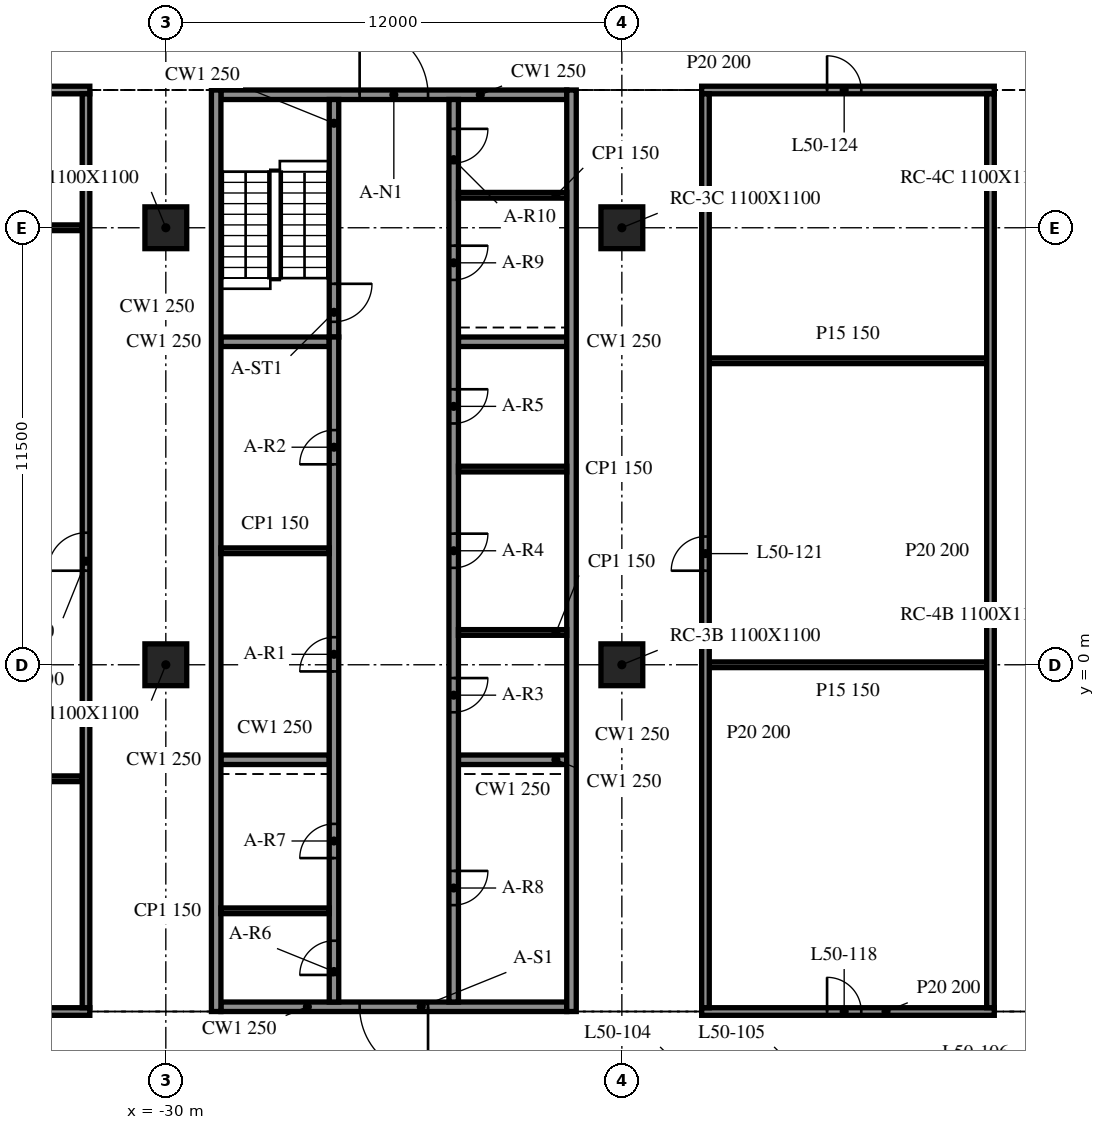
"""IFC4 building model, lengths in metres.
Left out: names, types, materials, properties, quantities, classifications, styles, units other than length and angle.
Written with IfcOpenShell. Run it as: python <this file> out.ifc"""

import sys

from ifc_helpers import new_model, si_unit, direction, frame, frame_2d, origin, origin_2d, place, context, subcontext, project, spatial, rectangle, extrude, element, fill, save


model = new_model("IFC4")
c1 = context("Model", 3, precision=1e-05, world=origin(), true_north=direction((0.0, 1.0)))
c2 = subcontext(c1, "Body", "Model", "MODEL_VIEW")
j1 = project(units=[si_unit("LENGTHUNIT", "METRE"), si_unit("PLANEANGLEUNIT", "RADIAN")], contexts=[c1])
p1 = place(None, origin())
s1 = spatial("IfcSite", under=j1, at=p1, CompositionType="ELEMENT")
p2 = place(p1, origin())
s2 = spatial("IfcBuilding", under=s1, at=p2, CompositionType="ELEMENT")
p3 = place(p2, frame((0.0, 0.0, 209.1)))
s3 = spatial("IfcBuildingStorey", under=s2, at=p3, CompositionType="ELEMENT", Elevation=209.1)
for number, where, z_axis, x_axis in (
    (1, (-30.0, 0.0, -0.34), (0.0, 0.0, 1.0), (1.0, 0.0, 0.0)),
    (2, (-30.0, 11.5, -0.34), (0.0, 0.0, 1.0), (1.0, 0.0, 0.0)),
    (3, (-18.0, 0.0, -0.34), (0.0, 0.0, 1.0), (1.0, 0.0, 0.0)),
    (4, (-18.0, 11.5, -0.34), (0.0, 0.0, 1.0), (1.0, 0.0, 0.0)),
):
    element("IfcColumn", number, at=place(p3, frame(where, z_axis=z_axis, x_axis=x_axis)), inside=s3, PredefinedType="COLUMN", context=c2, shape_type="SweptSolid", body=[
        extrude(rectangle(XDim=1.1, YDim=1.1, at=origin_2d()), origin(), (0.0, 0.0, 1.0), 3.8),
    ])
for number, where, z_axis, x_axis in (
    (5, (-28.675, 15.125, 0.0), (0.0, 0.0, 1.0), (0.0, -1.0, 0.0)),
    (6, (-19.325, -9.125, 0.0), (0.0, 0.0, 1.0), (0.0, 1.0, 0.0)),
):
    element("IfcWall", number, at=place(p3, frame(where, z_axis=z_axis, x_axis=x_axis)), inside=s3, PredefinedType="SOLIDWALL", context=c2, shape_type="SweptSolid", body=[
        extrude(rectangle(XDim=24.25, YDim=0.25, at=frame_2d((12.125, 0.0))), origin(), (0.0, 0.0, 1.0), 3.46),
    ])
p4 = place(p3, frame((-19.45, -9.0, 0.0), z_axis=(0.0, 0.0, 1.0), x_axis=(-1.0, 0.0, 0.0)))
e7 = element("IfcWall", 7, at=p4, inside=s3, PredefinedType="SOLIDWALL", context=c2, shape_type="SweptSolid", body=[
    extrude(rectangle(XDim=9.1, YDim=0.25, at=frame_2d((4.55, 0.0))), origin(), (0.0, 0.0, 1.0), 3.46),
])
p5 = place(p4, frame((3.65, 0.0, 0.0)))
e8 = element("IfcOpeningElement", 8, at=p5, cuts=e7, PredefinedType="OPENING", context=c2, shape_type="SweptSolid", body=[
    extrude(rectangle(XDim=1.8, YDim=2.1, at=frame_2d((0.9, 1.05))), frame((0.0, 0.135, 0.0), z_axis=(0.0, -1.0, 0.0), x_axis=(1.0, 0.0, 0.0)), (0.0, 0.0, 1.0), 0.27),
])
p6 = place(p3, frame((-28.55, 15.0, 0.0), z_axis=(0.0, 0.0, 1.0), x_axis=(1.0, 0.0, 0.0)))
e9 = element("IfcWall", 9, at=p6, inside=s3, PredefinedType="SOLIDWALL", context=c2, shape_type="SweptSolid", body=[
    extrude(rectangle(XDim=9.1, YDim=0.25, at=frame_2d((4.55, 0.0))), origin(), (0.0, 0.0, 1.0), 3.46),
])
p7 = place(p6, frame((3.65, 0.0, 0.0)))
e10 = element("IfcOpeningElement", 10, at=p7, cuts=e9, PredefinedType="OPENING", context=c2, shape_type="SweptSolid", body=[
    extrude(rectangle(XDim=1.8, YDim=2.1, at=frame_2d((0.9, 1.05))), frame((0.0, 0.135, 0.0), z_axis=(0.0, -1.0, 0.0), x_axis=(1.0, 0.0, 0.0)), (0.0, 0.0, 1.0), 0.27),
])
p8 = place(p3, frame((-25.575, -8.875, 0.0), z_axis=(0.0, 0.0, 1.0), x_axis=(0.0, 1.0, 0.0)))
e11 = element("IfcWall", 11, at=p8, inside=s3, PredefinedType="SOLIDWALL", context=c2, shape_type="SweptSolid", body=[
    extrude(rectangle(XDim=17.5, YDim=0.25, at=frame_2d((8.75, 0.0))), origin(), (0.0, 0.0, 1.0), 3.46),
])
p9 = place(p8, frame((8.7, 0.0, 0.0)))
e12 = element("IfcOpeningElement", 12, at=p9, cuts=e11, PredefinedType="OPENING", context=c2, shape_type="SweptSolid", body=[
    extrude(rectangle(XDim=0.9, YDim=2.1, at=frame_2d((0.45, 1.05))), frame((0.0, 0.135, 0.0), z_axis=(0.0, -1.0, 0.0), x_axis=(1.0, 0.0, 0.0)), (0.0, 0.0, 1.0), 0.27),
])
p10 = place(p8, frame((14.15, 0.0, 0.0)))
e13 = element("IfcOpeningElement", 13, at=p10, cuts=e11, PredefinedType="OPENING", context=c2, shape_type="SweptSolid", body=[
    extrude(rectangle(XDim=0.9, YDim=2.1, at=frame_2d((0.45, 1.05))), frame((0.0, 0.135, 0.0), z_axis=(0.0, -1.0, 0.0), x_axis=(1.0, 0.0, 0.0)), (0.0, 0.0, 1.0), 0.27),
])
p11 = place(p8, frame((0.712, 0.0, 0.0)))
e14 = element("IfcOpeningElement", 14, at=p11, cuts=e11, PredefinedType="OPENING", context=c2, shape_type="SweptSolid", body=[
    extrude(rectangle(XDim=0.9, YDim=2.1, at=frame_2d((0.45, 1.05))), frame((0.0, 0.135, 0.0), z_axis=(0.0, -1.0, 0.0), x_axis=(1.0, 0.0, 0.0)), (0.0, 0.0, 1.0), 0.27),
])
p12 = place(p8, frame((3.788, 0.0, 0.0)))
e15 = element("IfcOpeningElement", 15, at=p12, cuts=e11, PredefinedType="OPENING", context=c2, shape_type="SweptSolid", body=[
    extrude(rectangle(XDim=0.9, YDim=2.1, at=frame_2d((0.45, 1.05))), frame((0.0, 0.135, 0.0), z_axis=(0.0, -1.0, 0.0), x_axis=(1.0, 0.0, 0.0)), (0.0, 0.0, 1.0), 0.27),
])
p13 = place(p3, frame((-25.575, 14.875, 0.0), z_axis=(0.0, 0.0, 1.0), x_axis=(0.0, -1.0, 0.0)))
e16 = element("IfcWall", 16, at=p13, inside=s3, PredefinedType="SOLIDWALL", context=c2, shape_type="SweptSolid", body=[
    extrude(rectangle(XDim=6.25, YDim=0.25, at=frame_2d((3.125, 0.0))), origin(), (0.0, 0.0, 1.0), 3.46),
])
p14 = place(p13, frame((4.85, 0.0, 0.0)))
e17 = element("IfcOpeningElement", 17, at=p14, cuts=e16, PredefinedType="OPENING", context=c2, shape_type="SweptSolid", body=[
    extrude(rectangle(XDim=1.0, YDim=2.1, at=frame_2d((0.5, 1.05))), frame((0.0, 0.135, 0.0), z_axis=(0.0, -1.0, 0.0), x_axis=(1.0, 0.0, 0.0)), (0.0, 0.0, 1.0), 0.27),
])
p15 = place(p3, frame((-22.425, 14.875, 0.0), z_axis=(0.0, 0.0, 1.0), x_axis=(0.0, -1.0, 0.0)))
e18 = element("IfcWall", 18, at=p15, inside=s3, PredefinedType="SOLIDWALL", context=c2, shape_type="SweptSolid", body=[
    extrude(rectangle(XDim=23.75, YDim=0.25, at=frame_2d((11.875, 0.0))), origin(), (0.0, 0.0, 1.0), 3.46),
])
p16 = place(p15, frame((15.225, 0.0, 0.0)))
e19 = element("IfcOpeningElement", 19, at=p16, cuts=e18, PredefinedType="OPENING", context=c2, shape_type="SweptSolid", body=[
    extrude(rectangle(XDim=0.9, YDim=2.1, at=frame_2d((0.45, 1.05))), frame((0.0, 0.135, 0.0), z_axis=(0.0, -1.0, 0.0), x_axis=(1.0, 0.0, 0.0)), (0.0, 0.0, 1.0), 0.27),
])
p17 = place(p15, frame((11.425, 0.0, 0.0)))
e20 = element("IfcOpeningElement", 20, at=p17, cuts=e18, PredefinedType="OPENING", context=c2, shape_type="SweptSolid", body=[
    extrude(rectangle(XDim=0.9, YDim=2.1, at=frame_2d((0.45, 1.05))), frame((0.0, 0.135, 0.0), z_axis=(0.0, -1.0, 0.0), x_axis=(1.0, 0.0, 0.0)), (0.0, 0.0, 1.0), 0.27),
])
p18 = place(p15, frame((7.625, 0.0, 0.0)))
e21 = element("IfcOpeningElement", 21, at=p18, cuts=e18, PredefinedType="OPENING", context=c2, shape_type="SweptSolid", body=[
    extrude(rectangle(XDim=0.9, YDim=2.1, at=frame_2d((0.45, 1.05))), frame((0.0, 0.135, 0.0), z_axis=(0.0, -1.0, 0.0), x_axis=(1.0, 0.0, 0.0)), (0.0, 0.0, 1.0), 0.27),
])
p19 = place(p15, frame((20.3, 0.0, 0.0)))
e22 = element("IfcOpeningElement", 22, at=p19, cuts=e18, PredefinedType="OPENING", context=c2, shape_type="SweptSolid", body=[
    extrude(rectangle(XDim=0.9, YDim=2.1, at=frame_2d((0.45, 1.05))), frame((0.0, 0.135, 0.0), z_axis=(0.0, -1.0, 0.0), x_axis=(1.0, 0.0, 0.0)), (0.0, 0.0, 1.0), 0.27),
])
p20 = place(p15, frame((3.847, 0.0, 0.0)))
e23 = element("IfcOpeningElement", 23, at=p20, cuts=e18, PredefinedType="OPENING", context=c2, shape_type="SweptSolid", body=[
    extrude(rectangle(XDim=0.9, YDim=2.1, at=frame_2d((0.45, 1.05))), frame((0.0, 0.135, 0.0), z_axis=(0.0, -1.0, 0.0), x_axis=(1.0, 0.0, 0.0)), (0.0, 0.0, 1.0), 0.27),
])
p21 = place(p15, frame((0.772, 0.0, 0.0)))
e24 = element("IfcOpeningElement", 24, at=p21, cuts=e18, PredefinedType="OPENING", context=c2, shape_type="SweptSolid", body=[
    extrude(rectangle(XDim=0.9, YDim=2.1, at=frame_2d((0.45, 1.05))), frame((0.0, 0.135, 0.0), z_axis=(0.0, -1.0, 0.0), x_axis=(1.0, 0.0, 0.0)), (0.0, 0.0, 1.0), 0.27),
])
for number, where, z_axis, x_axis in (
    (25, (-28.55, -2.5, 0.0), (0.0, 0.0, 1.0), (1.0, 0.0, 0.0)),
    (26, (-28.55, 8.5, 0.0), (0.0, 0.0, 1.0), (1.0, 0.0, 0.0)),
    (27, (-22.3, -2.5, 0.0), (0.0, 0.0, 1.0), (1.0, 0.0, 0.0)),
    (28, (-22.3, 8.5, 0.0), (0.0, 0.0, 1.0), (1.0, 0.0, 0.0)),
):
    element("IfcWall", number, at=place(p3, frame(where, z_axis=z_axis, x_axis=x_axis)), inside=s3, PredefinedType="SOLIDWALL", context=c2, shape_type="SweptSolid", body=[
        extrude(rectangle(XDim=2.85, YDim=0.25, at=frame_2d((1.425, 0.0))), origin(), (0.0, 0.0, 1.0), 3.46),
    ])
for number, where, z_axis, x_axis in (
    (29, (-28.55, 3.0, 0.0), (0.0, 0.0, 1.0), (1.0, 0.0, 0.0)),
    (30, (-22.3, 0.85, 0.0), (0.0, 0.0, 1.0), (1.0, 0.0, 0.0)),
    (31, (-22.3, 5.15, 0.0), (0.0, 0.0, 1.0), (1.0, 0.0, 0.0)),
    (32, (-28.55, -6.475, 0.0), (0.0, 0.0, 1.0), (1.0, 0.0, 0.0)),
    (33, (-22.3, 12.355, 0.0), (0.0, 0.0, 1.0), (1.0, 0.0, 0.0)),
):
    element("IfcWall", number, at=place(p3, frame(where, z_axis=z_axis, x_axis=x_axis)), inside=s3, PredefinedType="PARTITIONING", context=c2, shape_type="SweptSolid", body=[
        extrude(rectangle(XDim=2.85, YDim=0.15, at=frame_2d((1.425, 0.0))), origin(), (0.0, 0.0, 1.0), 3.46),
    ])
p22 = place(p3, frame((-41.975, -9.125, 0.0), z_axis=(0.0, 0.0, 1.0), x_axis=(1.0, 0.0, 0.0)))
e34 = element("IfcWall", 34, at=p22, inside=s3, PredefinedType="PARTITIONING", context=c2, shape_type="SweptSolid", body=[
    extrude(rectangle(XDim=9.975, YDim=0.2, at=frame_2d((4.988, 0.0))), origin(), (0.0, 0.0, 1.0), 3.46),
])
p23 = place(p22, frame((4.5, 0.0, 0.0)))
e35 = element("IfcOpeningElement", 35, at=p23, cuts=e34, PredefinedType="OPENING", context=c2, shape_type="SweptSolid", body=[
    extrude(rectangle(XDim=1.0, YDim=2.1, at=frame_2d((0.5, 1.05))), frame((0.0, 0.11, 0.0), z_axis=(0.0, -1.0, 0.0), x_axis=(1.0, 0.0, 0.0)), (0.0, 0.0, 1.0), 0.22),
])
p24 = place(p3, frame((-15.9, -9.125, 0.0), z_axis=(0.0, 0.0, 1.0), x_axis=(1.0, 0.0, 0.0)))
e36 = element("IfcWall", 36, at=p24, inside=s3, PredefinedType="PARTITIONING", context=c2, shape_type="SweptSolid", body=[
    extrude(rectangle(XDim=7.7, YDim=0.2, at=frame_2d((3.85, 0.0))), origin(), (0.0, 0.0, 1.0), 3.46),
])
p25 = place(p24, frame((3.3, 0.0, 0.0)))
e37 = element("IfcOpeningElement", 37, at=p25, cuts=e36, PredefinedType="OPENING", context=c2, shape_type="SweptSolid", body=[
    extrude(rectangle(XDim=0.9, YDim=2.1, at=frame_2d((0.45, 1.05))), frame((0.0, 0.11, 0.0), z_axis=(0.0, -1.0, 0.0), x_axis=(1.0, 0.0, 0.0)), (0.0, 0.0, 1.0), 0.22),
])
p26 = place(p3, frame((-41.975, -3.0, 0.0), z_axis=(0.0, 0.0, 1.0), x_axis=(1.0, 0.0, 0.0)))
e38 = element("IfcWall", 38, at=p26, inside=s3, PredefinedType="PARTITIONING", context=c2, shape_type="SweptSolid", body=[
    extrude(rectangle(XDim=9.775, YDim=0.15, at=frame_2d((4.888, 0.0))), origin(), (0.0, 0.0, 1.0), 3.46),
])
for number, where, z_axis, x_axis in (
    (39, (-15.7, 0.0, 0.0), (0.0, 0.0, 1.0), (1.0, 0.0, 0.0)),
    (40, (-15.7, 8.0, 0.0), (0.0, 0.0, 1.0), (1.0, 0.0, 0.0)),
):
    element("IfcWall", number, at=place(p3, frame(where, z_axis=z_axis, x_axis=x_axis)), inside=s3, PredefinedType="PARTITIONING", context=c2, shape_type="SweptSolid", body=[
        extrude(rectangle(XDim=7.3, YDim=0.15, at=frame_2d((3.65, 0.0))), origin(), (0.0, 0.0, 1.0), 3.46),
    ])
p27 = place(p3, frame((-41.45, 11.5, 0.0), z_axis=(0.0, 0.0, 1.0), x_axis=(1.0, 0.0, 0.0)))
e41 = element("IfcWall", 41, at=p27, inside=s3, PredefinedType="PARTITIONING", context=c2, shape_type="SweptSolid", body=[
    extrude(rectangle(XDim=9.25, YDim=0.15, at=frame_2d((4.625, 0.0))), origin(), (0.0, 0.0, 1.0), 3.46),
])
p28 = place(p3, frame((-41.975, 15.125, 0.0), z_axis=(0.0, 0.0, 1.0), x_axis=(1.0, 0.0, 0.0)))
e42 = element("IfcWall", 42, at=p28, inside=s3, PredefinedType="PARTITIONING", context=c2, shape_type="SweptSolid", body=[
    extrude(rectangle(XDim=9.975, YDim=0.2, at=frame_2d((4.988, 0.0))), origin(), (0.0, 0.0, 1.0), 3.46),
])
p29 = place(p28, frame((4.5, 0.0, 0.0)))
e43 = element("IfcOpeningElement", 43, at=p29, cuts=e42, PredefinedType="OPENING", context=c2, shape_type="SweptSolid", body=[
    extrude(rectangle(XDim=0.9, YDim=2.1, at=frame_2d((0.45, 1.05))), frame((0.0, 0.11, 0.0), z_axis=(0.0, -1.0, 0.0), x_axis=(1.0, 0.0, 0.0)), (0.0, 0.0, 1.0), 0.22),
])
p30 = place(p3, frame((-15.9, 15.125, 0.0), z_axis=(0.0, 0.0, 1.0), x_axis=(1.0, 0.0, 0.0)))
e44 = element("IfcWall", 44, at=p30, inside=s3, PredefinedType="PARTITIONING", context=c2, shape_type="SweptSolid", body=[
    extrude(rectangle(XDim=7.7, YDim=0.2, at=frame_2d((3.85, 0.0))), origin(), (0.0, 0.0, 1.0), 3.46),
])
p31 = place(p30, frame((3.3, 0.0, 0.0)))
e45 = element("IfcOpeningElement", 45, at=p31, cuts=e44, PredefinedType="OPENING", context=c2, shape_type="SweptSolid", body=[
    extrude(rectangle(XDim=0.9, YDim=2.1, at=frame_2d((0.45, 1.05))), frame((0.0, 0.11, 0.0), z_axis=(0.0, -1.0, 0.0), x_axis=(1.0, 0.0, 0.0)), (0.0, 0.0, 1.0), 0.22),
])
p32 = place(p3, frame((-32.1, -9.025, 0.0), z_axis=(0.0, 0.0, 1.0), x_axis=(0.0, 1.0, 0.0)))
e46 = element("IfcWall", 46, at=p32, inside=s3, PredefinedType="PARTITIONING", context=c2, shape_type="SweptSolid", body=[
    extrude(rectangle(XDim=24.05, YDim=0.2, at=frame_2d((12.025, 0.0))), origin(), (0.0, 0.0, 1.0), 3.46),
])
p33 = place(p32, frame((11.5, 0.0, 0.0)))
e47 = element("IfcOpeningElement", 47, at=p33, cuts=e46, PredefinedType="OPENING", context=c2, shape_type="SweptSolid", body=[
    extrude(rectangle(XDim=1.0, YDim=2.1, at=frame_2d((0.5, 1.05))), frame((0.0, 0.11, 0.0), z_axis=(0.0, -1.0, 0.0), x_axis=(1.0, 0.0, 0.0)), (0.0, 0.0, 1.0), 0.22),
])
p34 = place(p3, frame((-15.8, -9.025, 0.0), z_axis=(0.0, 0.0, 1.0), x_axis=(0.0, 1.0, 0.0)))
e48 = element("IfcWall", 48, at=p34, inside=s3, PredefinedType="PARTITIONING", context=c2, shape_type="SweptSolid", body=[
    extrude(rectangle(XDim=24.05, YDim=0.2, at=frame_2d((12.025, 0.0))), origin(), (0.0, 0.0, 1.0), 3.46),
])
p35 = place(p34, frame((11.5, 0.0, 0.0)))
e49 = element("IfcOpeningElement", 49, at=p35, cuts=e48, PredefinedType="OPENING", context=c2, shape_type="SweptSolid", body=[
    extrude(rectangle(XDim=0.9, YDim=2.1, at=frame_2d((0.45, 1.05))), frame((0.0, 0.11, 0.0), z_axis=(0.0, -1.0, 0.0), x_axis=(1.0, 0.0, 0.0)), (0.0, 0.0, 1.0), 0.22),
])
p36 = place(p3, frame((-8.3, -9.025, 0.0), z_axis=(0.0, 0.0, 1.0), x_axis=(0.0, 1.0, 0.0)))
e50 = element("IfcWall", 50, at=p36, inside=s3, PredefinedType="PARTITIONING", context=c2, shape_type="SweptSolid", body=[
    extrude(rectangle(XDim=24.05, YDim=0.2, at=frame_2d((12.025, 0.0))), origin(), (0.0, 0.0, 1.0), 3.46),
])
p37 = place(p5, origin())
e51 = element("IfcDoor", 51, at=p37, inside=s3, OperationType="DOUBLE_DOOR_SINGLE_SWING", PredefinedType="DOOR", context=c2, shape_type="SweptSolid", body=[
    extrude(rectangle(XDim=1.8, YDim=2.1, at=frame_2d((0.9, 1.05))), frame((0.0, 0.025, 0.0), z_axis=(0.0, -1.0, 0.0), x_axis=(1.0, 0.0, 0.0)), (0.0, 0.0, 1.0), 0.05),
])
fill(e8, e51)
p38 = place(p7, origin())
e52 = element("IfcDoor", 52, at=p38, inside=s3, OperationType="DOUBLE_DOOR_SINGLE_SWING", PredefinedType="DOOR", context=c2, shape_type="SweptSolid", body=[
    extrude(rectangle(XDim=1.8, YDim=2.1, at=frame_2d((0.9, 1.05))), frame((0.0, 0.025, 0.0), z_axis=(0.0, -1.0, 0.0), x_axis=(1.0, 0.0, 0.0)), (0.0, 0.0, 1.0), 0.05),
])
fill(e10, e52)
p39 = place(p9, origin())
e53 = element("IfcDoor", 53, at=p39, inside=s3, OperationType="SINGLE_SWING_LEFT", PredefinedType="DOOR", context=c2, shape_type="SweptSolid", body=[
    extrude(rectangle(XDim=0.9, YDim=2.1, at=frame_2d((0.45, 1.05))), frame((0.0, 0.025, 0.0), z_axis=(0.0, -1.0, 0.0), x_axis=(1.0, 0.0, 0.0)), (0.0, 0.0, 1.0), 0.05),
])
fill(e12, e53)
p40 = place(p10, origin())
e54 = element("IfcDoor", 54, at=p40, inside=s3, OperationType="SINGLE_SWING_RIGHT", PredefinedType="DOOR", context=c2, shape_type="SweptSolid", body=[
    extrude(rectangle(XDim=0.9, YDim=2.1, at=frame_2d((0.45, 1.05))), frame((0.0, 0.025, 0.0), z_axis=(0.0, -1.0, 0.0), x_axis=(1.0, 0.0, 0.0)), (0.0, 0.0, 1.0), 0.05),
])
fill(e13, e54)
p41 = place(p16, origin())
e55 = element("IfcDoor", 55, at=p41, inside=s3, OperationType="SINGLE_SWING_LEFT", PredefinedType="DOOR", context=c2, shape_type="SweptSolid", body=[
    extrude(rectangle(XDim=0.9, YDim=2.1, at=frame_2d((0.45, 1.05))), frame((0.0, 0.025, 0.0), z_axis=(0.0, -1.0, 0.0), x_axis=(1.0, 0.0, 0.0)), (0.0, 0.0, 1.0), 0.05),
])
fill(e19, e55)
p42 = place(p17, origin())
e56 = element("IfcDoor", 56, at=p42, inside=s3, OperationType="SINGLE_SWING_RIGHT", PredefinedType="DOOR", context=c2, shape_type="SweptSolid", body=[
    extrude(rectangle(XDim=0.9, YDim=2.1, at=frame_2d((0.45, 1.05))), frame((0.0, 0.025, 0.0), z_axis=(0.0, -1.0, 0.0), x_axis=(1.0, 0.0, 0.0)), (0.0, 0.0, 1.0), 0.05),
])
fill(e20, e56)
p43 = place(p18, origin())
e57 = element("IfcDoor", 57, at=p43, inside=s3, OperationType="SINGLE_SWING_LEFT", PredefinedType="DOOR", context=c2, shape_type="SweptSolid", body=[
    extrude(rectangle(XDim=0.9, YDim=2.1, at=frame_2d((0.45, 1.05))), frame((0.0, 0.025, 0.0), z_axis=(0.0, -1.0, 0.0), x_axis=(1.0, 0.0, 0.0)), (0.0, 0.0, 1.0), 0.05),
])
fill(e21, e57)
p44 = place(p11, origin())
e58 = element("IfcDoor", 58, at=p44, inside=s3, OperationType="SINGLE_SWING_RIGHT", PredefinedType="DOOR", context=c2, shape_type="SweptSolid", body=[
    extrude(rectangle(XDim=0.9, YDim=2.1, at=frame_2d((0.45, 1.05))), frame((0.0, 0.025, 0.0), z_axis=(0.0, -1.0, 0.0), x_axis=(1.0, 0.0, 0.0)), (0.0, 0.0, 1.0), 0.05),
])
fill(e14, e58)
p45 = place(p12, origin())
e59 = element("IfcDoor", 59, at=p45, inside=s3, OperationType="SINGLE_SWING_LEFT", PredefinedType="DOOR", context=c2, shape_type="SweptSolid", body=[
    extrude(rectangle(XDim=0.9, YDim=2.1, at=frame_2d((0.45, 1.05))), frame((0.0, 0.025, 0.0), z_axis=(0.0, -1.0, 0.0), x_axis=(1.0, 0.0, 0.0)), (0.0, 0.0, 1.0), 0.05),
])
fill(e15, e59)
p46 = place(p19, origin())
e60 = element("IfcDoor", 60, at=p46, inside=s3, OperationType="SINGLE_SWING_RIGHT", PredefinedType="DOOR", context=c2, shape_type="SweptSolid", body=[
    extrude(rectangle(XDim=0.9, YDim=2.1, at=frame_2d((0.45, 1.05))), frame((0.0, 0.025, 0.0), z_axis=(0.0, -1.0, 0.0), x_axis=(1.0, 0.0, 0.0)), (0.0, 0.0, 1.0), 0.05),
])
fill(e22, e60)
p47 = place(p20, origin())
e61 = element("IfcDoor", 61, at=p47, inside=s3, OperationType="SINGLE_SWING_LEFT", PredefinedType="DOOR", context=c2, shape_type="SweptSolid", body=[
    extrude(rectangle(XDim=0.9, YDim=2.1, at=frame_2d((0.45, 1.05))), frame((0.0, 0.025, 0.0), z_axis=(0.0, -1.0, 0.0), x_axis=(1.0, 0.0, 0.0)), (0.0, 0.0, 1.0), 0.05),
])
fill(e23, e61)
p48 = place(p21, origin())
e62 = element("IfcDoor", 62, at=p48, inside=s3, OperationType="SINGLE_SWING_RIGHT", PredefinedType="DOOR", context=c2, shape_type="SweptSolid", body=[
    extrude(rectangle(XDim=0.9, YDim=2.1, at=frame_2d((0.45, 1.05))), frame((0.0, 0.025, 0.0), z_axis=(0.0, -1.0, 0.0), x_axis=(1.0, 0.0, 0.0)), (0.0, 0.0, 1.0), 0.05),
])
fill(e24, e62)
p49 = place(p14, origin())
e63 = element("IfcDoor", 63, at=p49, inside=s3, OperationType="SINGLE_SWING_LEFT", PredefinedType="DOOR", context=c2, shape_type="SweptSolid", body=[
    extrude(rectangle(XDim=1.0, YDim=2.1, at=frame_2d((0.5, 1.05))), frame((0.0, 0.025, 0.0), z_axis=(0.0, -1.0, 0.0), x_axis=(1.0, 0.0, 0.0)), (0.0, 0.0, 1.0), 0.05),
])
fill(e17, e63)
p50 = place(p25, origin())
e64 = element("IfcDoor", 64, at=p50, inside=s3, OperationType="SINGLE_SWING_LEFT", PredefinedType="DOOR", context=c2, shape_type="SweptSolid", body=[
    extrude(rectangle(XDim=0.9, YDim=2.1, at=frame_2d((0.45, 1.05))), frame((0.0, 0.025, 0.0), z_axis=(0.0, -1.0, 0.0), x_axis=(1.0, 0.0, 0.0)), (0.0, 0.0, 1.0), 0.05),
])
fill(e37, e64)
p51 = place(p33, origin())
e65 = element("IfcDoor", 65, at=p51, inside=s3, OperationType="SINGLE_SWING_LEFT", PredefinedType="DOOR", context=c2, shape_type="SweptSolid", body=[
    extrude(rectangle(XDim=1.0, YDim=2.1, at=frame_2d((0.5, 1.05))), frame((0.0, 0.025, 0.0), z_axis=(0.0, -1.0, 0.0), x_axis=(1.0, 0.0, 0.0)), (0.0, 0.0, 1.0), 0.05),
])
fill(e47, e65)
p52 = place(p35, origin())
e66 = element("IfcDoor", 66, at=p52, inside=s3, OperationType="SINGLE_SWING_RIGHT", PredefinedType="DOOR", context=c2, shape_type="SweptSolid", body=[
    extrude(rectangle(XDim=0.9, YDim=2.1, at=frame_2d((0.45, 1.05))), frame((0.0, 0.025, 0.0), z_axis=(0.0, -1.0, 0.0), x_axis=(1.0, 0.0, 0.0)), (0.0, 0.0, 1.0), 0.05),
])
fill(e49, e66)
p53 = place(p31, origin())
e67 = element("IfcDoor", 67, at=p53, inside=s3, OperationType="SINGLE_SWING_RIGHT", PredefinedType="DOOR", context=c2, shape_type="SweptSolid", body=[
    extrude(rectangle(XDim=0.9, YDim=2.1, at=frame_2d((0.45, 1.05))), frame((0.0, 0.025, 0.0), z_axis=(0.0, -1.0, 0.0), x_axis=(1.0, 0.0, 0.0)), (0.0, 0.0, 1.0), 0.05),
])
fill(e45, e67)
save(model, sys.argv[1])
